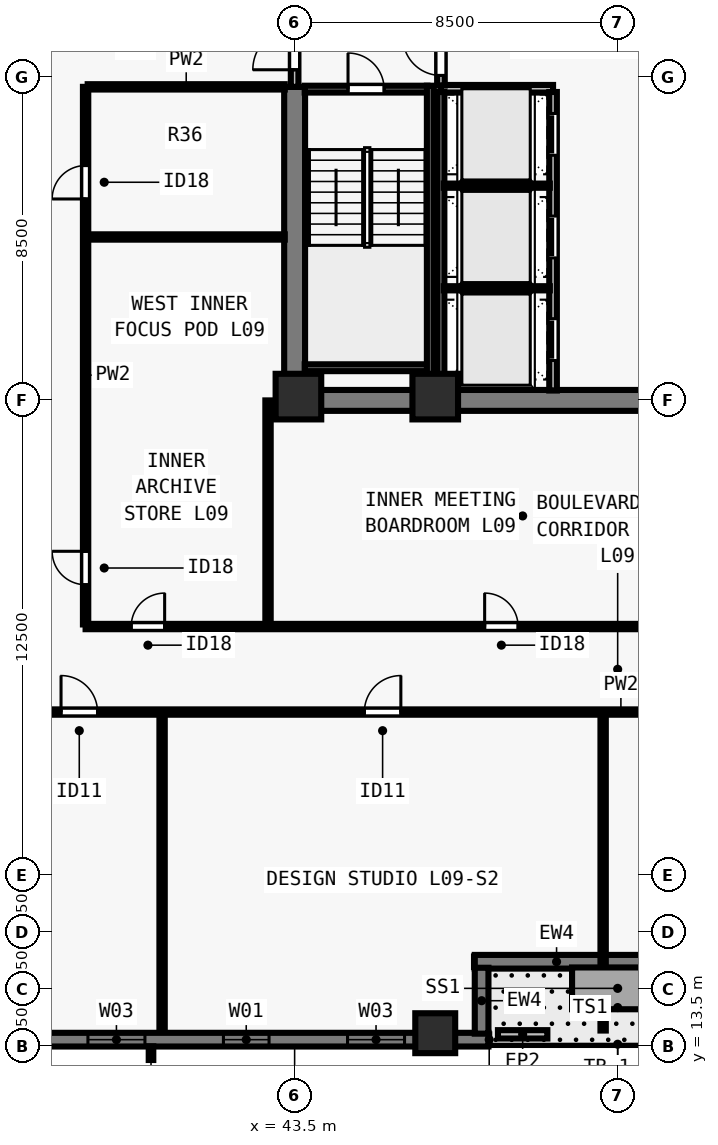
"""IFC4 building model, lengths in metres.
Left out: names, types, materials, properties, quantities, classifications, styles, units other than length and angle.
Written with IfcOpenShell. Run it as: python <this file> out.ifc"""

import sys

from ifc_helpers import new_model, si_unit, direction, frame, frame_2d, origin, origin_2d, place, context, subcontext, project, spatial, rectangle, extrude, element, fill, save


model = new_model("IFC4")
c1 = context("Model", 3, precision=1e-05, world=origin(), true_north=direction((0.0, 1.0)))
c2 = subcontext(c1, "Body", "Model", "MODEL_VIEW")
j1 = project(units=[si_unit("LENGTHUNIT", "METRE"), si_unit("PLANEANGLEUNIT", "RADIAN")], contexts=[c1])
p1 = place(None, origin())
s1 = spatial("IfcSite", under=j1, at=p1, CompositionType="ELEMENT")
p2 = place(p1, origin())
s2 = spatial("IfcBuilding", under=s1, at=p2, CompositionType="ELEMENT")
p3 = place(p2, frame((0.0, 0.0, 37.5)))
s3 = spatial("IfcBuildingStorey", under=s2, at=p3, CompositionType="ELEMENT", Elevation=37.5)
for number, where, z_axis, x_axis in (
    (1, (43.6, 30.6, 0.0), (0.0, 0.0, 1.0), (1.0, 0.0, 0.0)),
    (2, (47.2, 30.6, 0.0), (0.0, 0.0, 1.0), (1.0, 0.0, 0.0)),
):
    element("IfcColumn", number, at=place(p3, frame(where, z_axis=z_axis, x_axis=x_axis)), inside=s3, PredefinedType="COLUMN", context=c2, shape_type="SweptSolid", body=[
        extrude(rectangle(XDim=1.2, YDim=1.2, at=origin_2d()), origin(), (0.0, 0.0, 1.0), 3.5),
    ])
p4 = place(p3, frame((47.2, 13.85, 0.0), z_axis=(0.0, 0.0, 1.0), x_axis=(1.0, 0.0, 0.0)))
e3 = element("IfcColumn", 3, at=p4, inside=s3, PredefinedType="COLUMN", context=c2, shape_type="SweptSolid", body=[
    extrude(rectangle(XDim=1.05, YDim=1.05, at=origin_2d()), origin(), (0.0, 0.0, 1.0), 3.5),
])
p5 = place(p3, frame((48.6, 13.68, 0.0), z_axis=(0.0, 0.0, 1.0), x_axis=(-1.0, 0.0, 0.0)))
e4 = element("IfcWall", 4, at=p5, inside=s3, PredefinedType="SOLIDWALL", context=c2, shape_type="SweptSolid", body=[
    extrude(rectangle(XDim=18.762, YDim=0.36, at=frame_2d((9.381, 0.0))), origin(), (0.0, 0.0, 1.0), 3.28),
])
p6 = place(p5, frame((2.208, 0.0, 0.8)))
e5 = element("IfcOpeningElement", 5, at=p6, cuts=e4, PredefinedType="OPENING", context=c2, shape_type="SweptSolid", body=[
    extrude(rectangle(XDim=1.5, YDim=1.544, at=frame_2d((0.75, 0.772))), frame((0.0, 0.19, 0.0), z_axis=(0.0, -1.0, 0.0), x_axis=(1.0, 0.0, 0.0)), (0.0, 0.0, 1.0), 0.38),
])
p7 = place(p5, frame((5.773, 0.0, 0.8)))
e6 = element("IfcOpeningElement", 6, at=p7, cuts=e4, PredefinedType="OPENING", context=c2, shape_type="SweptSolid", body=[
    extrude(rectangle(XDim=1.2, YDim=1.544, at=frame_2d((0.6, 0.772))), frame((0.0, 0.19, 0.0), z_axis=(0.0, -1.0, 0.0), x_axis=(1.0, 0.0, 0.0)), (0.0, 0.0, 1.0), 0.38),
])
p8 = place(p5, frame((9.039, 0.0, 0.8)))
e7 = element("IfcOpeningElement", 7, at=p8, cuts=e4, PredefinedType="OPENING", context=c2, shape_type="SweptSolid", body=[
    extrude(rectangle(XDim=1.5, YDim=1.544, at=frame_2d((0.75, 0.772))), frame((0.0, 0.19, 0.0), z_axis=(0.0, -1.0, 0.0), x_axis=(1.0, 0.0, 0.0)), (0.0, 0.0, 1.0), 0.38),
])
p9 = place(p5, frame((12.604, 0.0, 0.8)))
e8 = element("IfcOpeningElement", 8, at=p9, cuts=e4, PredefinedType="OPENING", context=c2, shape_type="SweptSolid", body=[
    extrude(rectangle(XDim=1.2, YDim=1.544, at=frame_2d((0.6, 0.772))), frame((0.0, 0.19, 0.0), z_axis=(0.0, -1.0, 0.0), x_axis=(1.0, 0.0, 0.0)), (0.0, 0.0, 1.0), 0.38),
])
p10 = place(p3, frame((55.422, 15.73, 0.0), z_axis=(0.0, 0.0, 1.0), x_axis=(-1.0, 0.0, 0.0)))
e9 = element("IfcWall", 9, at=p10, inside=s3, PredefinedType="SOLIDWALL", context=c2, shape_type="SweptSolid", body=[
    extrude(rectangle(XDim=7.182, YDim=0.36, at=frame_2d((3.591, 0.0))), origin(), (0.0, 0.0, 1.0), 3.28),
])
p11 = place(p10, frame((1.727, 0.0, 0.0)))
e10 = element("IfcOpeningElement", 10, at=p11, cuts=e9, PredefinedType="OPENING", context=c2, shape_type="SweptSolid", body=[
    extrude(rectangle(XDim=1.0, YDim=2.15, at=frame_2d((0.5, 1.075))), frame((0.0, 0.19, 0.0), z_axis=(0.0, -1.0, 0.0), x_axis=(1.0, 0.0, 0.0)), (0.0, 0.0, 1.0), 0.38),
])
p12 = place(p3, frame((48.42, 15.572, 0.0), z_axis=(0.0, 0.0, 1.0), x_axis=(0.0, -1.0, 0.0)))
e11 = element("IfcWall", 11, at=p12, inside=s3, PredefinedType="SOLIDWALL", context=c2, shape_type="SweptSolid", body=[
    extrude(rectangle(XDim=1.734, YDim=0.36, at=frame_2d((0.867, 0.0))), origin(), (0.0, 0.0, 1.0), 3.28),
])
p13 = place(p3, frame((48.85, 13.82, 0.0), z_axis=(0.0, 0.0, 1.0), x_axis=(1.0, 0.0, 0.0)))
e12 = element("IfcWall", 12, at=p13, inside=s3, PredefinedType="PARAPET", context=c2, shape_type="SweptSolid", body=[
    extrude(rectangle(XDim=1.3, YDim=0.22, at=frame_2d((0.65, 0.0))), origin(), (0.0, 0.0, 1.0), 0.55),
])
p14 = place(p3, frame((43.225, 30.5, 0.0), z_axis=(0.0, 0.0, 1.0), x_axis=(1.0, 0.0, 0.0)))
e13 = element("IfcWall", 13, at=p14, inside=s3, PredefinedType="SHEAR", context=c2, shape_type="SweptSolid", body=[
    extrude(rectangle(XDim=17.55, YDim=0.55, at=frame_2d((8.775, 0.0))), origin(), (0.0, 0.0, 1.0), 3.28),
])
p15 = place(p3, frame((43.5, 30.765, 0.0), z_axis=(0.0, 0.0, 1.0), x_axis=(0.0, 1.0, 0.0)))
e14 = element("IfcWall", 14, at=p15, inside=s3, PredefinedType="SHEAR", context=c2, shape_type="SweptSolid", body=[
    extrude(rectangle(XDim=7.985, YDim=0.55, at=frame_2d((3.993, 0.0))), origin(), (0.0, 0.0, 1.0), 3.28),
])
p16 = place(p3, frame((47.35, 38.7, 0.0), z_axis=(0.0, 0.0, 1.0), x_axis=(1.0, 0.0, 0.0)))
e15 = element("IfcWall", 15, at=p16, inside=s3, PredefinedType="SOLIDWALL", context=c2, shape_type="SweptSolid", body=[
    extrude(rectangle(XDim=2.95, YDim=0.2, at=frame_2d((1.475, 0.0))), origin(), (0.0, 0.0, 1.0), 3.28),
])
p17 = place(p3, frame((50.3, 30.76, 0.0), z_axis=(0.0, 0.0, 1.0), x_axis=(0.0, 1.0, 0.0)))
e16 = element("IfcWall", 16, at=p17, inside=s3, PredefinedType="SOLIDWALL", context=c2, shape_type="SweptSolid", body=[
    extrude(rectangle(XDim=7.855, YDim=0.2, at=frame_2d((3.927, 0.0))), origin(), (0.0, 0.0, 1.0), 3.28),
])
p18 = place(p17, frame((0.79, 0.0, 0.0)))
e17 = element("IfcOpeningElement", 17, at=p18, cuts=e16, PredefinedType="OPENING", context=c2, shape_type="SweptSolid", body=[
    extrude(rectangle(XDim=1.1, YDim=2.2, at=frame_2d((0.55, 1.1))), frame((0.0, 0.11, 0.0), z_axis=(0.0, -1.0, 0.0), x_axis=(1.0, 0.0, 0.0)), (0.0, 0.0, 1.0), 0.22),
])
p19 = place(p17, frame((3.49, 0.0, 0.0)))
e18 = element("IfcOpeningElement", 18, at=p19, cuts=e16, PredefinedType="OPENING", context=c2, shape_type="SweptSolid", body=[
    extrude(rectangle(XDim=1.1, YDim=2.2, at=frame_2d((0.55, 1.1))), frame((0.0, 0.11, 0.0), z_axis=(0.0, -1.0, 0.0), x_axis=(1.0, 0.0, 0.0)), (0.0, 0.0, 1.0), 0.22),
])
p20 = place(p17, frame((6.19, 0.0, 0.0)))
e19 = element("IfcOpeningElement", 19, at=p20, cuts=e16, PredefinedType="OPENING", context=c2, shape_type="SweptSolid", body=[
    extrude(rectangle(XDim=1.1, YDim=2.2, at=frame_2d((0.55, 1.1))), frame((0.0, 0.11, 0.0), z_axis=(0.0, -1.0, 0.0), x_axis=(1.0, 0.0, 0.0)), (0.0, 0.0, 1.0), 0.22),
])
p21 = place(p3, frame((43.5, 38.75, 0.0), z_axis=(0.0, 0.0, 1.0), x_axis=(0.0, 1.0, 0.0)))
e20 = element("IfcWall", 20, at=p21, inside=s3, PredefinedType="SOLIDWALL", context=c2, shape_type="SweptSolid", body=[
    extrude(rectangle(XDim=2.05, YDim=0.2, at=frame_2d((1.025, 0.0))), origin(), (0.0, 0.0, 1.0), 3.28),
])
p22 = place(p21, frame((0.45, 0.0, 0.0)))
e21 = element("IfcOpeningElement", 21, at=p22, cuts=e20, PredefinedType="OPENING", context=c2, shape_type="SweptSolid", body=[
    extrude(rectangle(XDim=1.1, YDim=2.15, at=frame_2d((0.55, 1.075))), frame((0.0, 0.11, 0.0), z_axis=(0.0, -1.0, 0.0), x_axis=(1.0, 0.0, 0.0)), (0.0, 0.0, 1.0), 0.22),
])
p23 = place(p3, frame((47.35, 38.785, 0.0), z_axis=(0.0, 0.0, 1.0), x_axis=(0.0, 1.0, 0.0)))
e22 = element("IfcWall", 22, at=p23, inside=s3, PredefinedType="SOLIDWALL", context=c2, shape_type="SweptSolid", body=[
    extrude(rectangle(XDim=4.865, YDim=0.2, at=frame_2d((2.433, 0.0))), origin(), (0.0, 0.0, 1.0), 3.28),
])
p24 = place(p23, frame((0.265, 0.0, 0.0)))
e23 = element("IfcOpeningElement", 23, at=p24, cuts=e22, PredefinedType="OPENING", context=c2, shape_type="SweptSolid", body=[
    extrude(rectangle(XDim=1.0, YDim=2.15, at=frame_2d((0.5, 1.075))), frame((0.0, 0.11, 0.0), z_axis=(0.0, -1.0, 0.0), x_axis=(1.0, 0.0, 0.0)), (0.0, 0.0, 1.0), 0.22),
])
p25 = place(p3, frame((47.35, 30.76, 0.0), z_axis=(0.0, 0.0, 1.0), x_axis=(0.0, 1.0, 0.0)))
e24 = element("IfcWall", 24, at=p25, inside=s3, PredefinedType="SOLIDWALL", context=c2, shape_type="SweptSolid", body=[
    extrude(rectangle(XDim=7.855, YDim=0.18, at=frame_2d((3.927, 0.0))), origin(), (0.0, 0.0, 1.0), 3.28),
])
for number, where, z_axis, x_axis in (
    (25, (47.425, 33.45, 0.0), (0.0, 0.0, 1.0), (1.0, 0.0, 0.0)),
    (26, (47.425, 36.15, 0.0), (0.0, 0.0, 1.0), (1.0, 0.0, 0.0)),
):
    element("IfcWall", number, at=place(p3, frame(where, z_axis=z_axis, x_axis=x_axis)), inside=s3, PredefinedType="PARTITIONING", context=c2, shape_type="SweptSolid", body=[
        extrude(rectangle(XDim=2.79, YDim=0.11, at=frame_2d((1.395, 0.0))), origin(), (0.0, 0.0, 1.0), 3.28),
    ])
p26 = place(p3, frame((35.75, 22.3, 0.0), z_axis=(0.0, 0.0, 1.0), x_axis=(1.0, 0.0, 0.0)))
e27 = element("IfcWall", 27, at=p26, inside=s3, PredefinedType="PARTITIONING", context=c2, shape_type="SweptSolid", body=[
    extrude(rectangle(XDim=32.5, YDim=0.14, at=frame_2d((16.25, 0.0))), origin(), (0.0, 0.0, 1.0), 3.28),
])
p27 = place(p26, frame((1.604, 0.0, 0.0)))
e28 = element("IfcOpeningElement", 28, at=p27, cuts=e27, PredefinedType="OPENING", context=c2, shape_type="SweptSolid", body=[
    extrude(rectangle(XDim=0.96, YDim=2.12, at=frame_2d((0.48, 1.06))), frame((0.0, 0.08, 0.0), z_axis=(0.0, -1.0, 0.0), x_axis=(1.0, 0.0, 0.0)), (0.0, 0.0, 1.0), 0.16),
])
p28 = place(p26, frame((9.585, 0.0, 0.0)))
e29 = element("IfcOpeningElement", 29, at=p28, cuts=e27, PredefinedType="OPENING", context=c2, shape_type="SweptSolid", body=[
    extrude(rectangle(XDim=0.96, YDim=2.12, at=frame_2d((0.48, 1.06))), frame((0.0, 0.08, 0.0), z_axis=(0.0, -1.0, 0.0), x_axis=(1.0, 0.0, 0.0)), (0.0, 0.0, 1.0), 0.16),
])
p29 = place(p26, frame((22.125, 0.0, 0.0)))
e30 = element("IfcOpeningElement", 30, at=p29, cuts=e27, PredefinedType="OPENING", context=c2, shape_type="SweptSolid", body=[
    extrude(rectangle(XDim=0.96, YDim=2.12, at=frame_2d((0.48, 1.06))), frame((0.0, 0.08, 0.0), z_axis=(0.0, -1.0, 0.0), x_axis=(1.0, 0.0, 0.0)), (0.0, 0.0, 1.0), 0.16),
])
p30 = place(p26, frame((31.18, 0.0, 0.0)))
e31 = element("IfcOpeningElement", 31, at=p30, cuts=e27, PredefinedType="OPENING", context=c2, shape_type="SweptSolid", body=[
    extrude(rectangle(XDim=0.96, YDim=2.12, at=frame_2d((0.48, 1.06))), frame((0.0, 0.08, 0.0), z_axis=(0.0, -1.0, 0.0), x_axis=(1.0, 0.0, 0.0)), (0.0, 0.0, 1.0), 0.16),
])
p31 = place(p3, frame((38.0, 24.55, 0.0), z_axis=(0.0, 0.0, 1.0), x_axis=(1.0, 0.0, 0.0)))
e32 = element("IfcWall", 32, at=p31, inside=s3, PredefinedType="PARTITIONING", context=c2, shape_type="SweptSolid", body=[
    extrude(rectangle(XDim=28.0, YDim=0.14, at=frame_2d((14.0, 0.0))), origin(), (0.0, 0.0, 1.0), 3.28),
])
p32 = place(p31, frame((1.2, 0.0, 0.0)))
e33 = element("IfcOpeningElement", 33, at=p32, cuts=e32, PredefinedType="OPENING", context=c2, shape_type="SweptSolid", body=[
    extrude(rectangle(XDim=0.88, YDim=2.1, at=frame_2d((0.44, 1.05))), frame((0.0, 0.08, 0.0), z_axis=(0.0, -1.0, 0.0), x_axis=(1.0, 0.0, 0.0)), (0.0, 0.0, 1.0), 0.16),
])
p33 = place(p31, frame((10.5, 0.0, 0.0)))
e34 = element("IfcOpeningElement", 34, at=p33, cuts=e32, PredefinedType="OPENING", context=c2, shape_type="SweptSolid", body=[
    extrude(rectangle(XDim=0.88, YDim=2.1, at=frame_2d((0.44, 1.05))), frame((0.0, 0.08, 0.0), z_axis=(0.0, -1.0, 0.0), x_axis=(1.0, 0.0, 0.0)), (0.0, 0.0, 1.0), 0.16),
])
p34 = place(p31, frame((21.0, 0.0, 0.0)))
e35 = element("IfcOpeningElement", 35, at=p34, cuts=e32, PredefinedType="OPENING", context=c2, shape_type="SweptSolid", body=[
    extrude(rectangle(XDim=0.88, YDim=2.1, at=frame_2d((0.44, 1.05))), frame((0.0, 0.08, 0.0), z_axis=(0.0, -1.0, 0.0), x_axis=(1.0, 0.0, 0.0)), (0.0, 0.0, 1.0), 0.16),
])
p35 = place(p3, frame((38.0, 24.605, 0.0), z_axis=(0.0, 0.0, 1.0), x_axis=(0.0, 1.0, 0.0)))
e36 = element("IfcWall", 36, at=p35, inside=s3, PredefinedType="PARTITIONING", context=c2, shape_type="SweptSolid", body=[
    extrude(rectangle(XDim=14.145, YDim=0.14, at=frame_2d((7.073, 0.0))), origin(), (0.0, 0.0, 1.0), 3.28),
])
p36 = place(p35, frame((1.045, 0.0, 0.0)))
e37 = element("IfcOpeningElement", 37, at=p36, cuts=e36, PredefinedType="OPENING", context=c2, shape_type="SweptSolid", body=[
    extrude(rectangle(XDim=0.88, YDim=2.1, at=frame_2d((0.44, 1.05))), frame((0.0, 0.08, 0.0), z_axis=(0.0, -1.0, 0.0), x_axis=(1.0, 0.0, 0.0)), (0.0, 0.0, 1.0), 0.16),
])
p37 = place(p35, frame((11.195, 0.0, 0.0)))
e38 = element("IfcOpeningElement", 38, at=p37, cuts=e36, PredefinedType="OPENING", context=c2, shape_type="SweptSolid", body=[
    extrude(rectangle(XDim=0.88, YDim=2.1, at=frame_2d((0.44, 1.05))), frame((0.0, 0.08, 0.0), z_axis=(0.0, -1.0, 0.0), x_axis=(1.0, 0.0, 0.0)), (0.0, 0.0, 1.0), 0.16),
])
p38 = place(p3, frame((38.055, 38.75, 0.0), z_axis=(0.0, 0.0, 1.0), x_axis=(1.0, 0.0, 0.0)))
e39 = element("IfcWall", 39, at=p38, inside=s3, PredefinedType="PARTITIONING", context=c2, shape_type="SweptSolid", body=[
    extrude(rectangle(XDim=5.185, YDim=0.14, at=frame_2d((2.593, 0.0))), origin(), (0.0, 0.0, 1.0), 3.28),
])
p39 = place(p3, frame((42.8, 24.605, 0.0), z_axis=(0.0, 0.0, 1.0), x_axis=(0.0, 1.0, 0.0)))
e40 = element("IfcWall", 40, at=p39, inside=s3, PredefinedType="PARTITIONING", context=c2, shape_type="SweptSolid", body=[
    extrude(rectangle(XDim=5.895, YDim=0.14, at=frame_2d((2.948, 0.0))), origin(), (0.0, 0.0, 1.0), 2.439),
])
p40 = place(p3, frame((38.055, 34.8, 0.0), z_axis=(0.0, 0.0, 1.0), x_axis=(1.0, 0.0, 0.0)))
e41 = element("IfcWall", 41, at=p40, inside=s3, PredefinedType="PARTITIONING", context=c2, shape_type="SweptSolid", body=[
    extrude(rectangle(XDim=5.185, YDim=0.14, at=frame_2d((2.593, 0.0))), origin(), (0.0, 0.0, 1.0), 3.28),
])
p41 = place(p3, frame((40.012, 13.92, 0.0), z_axis=(0.0, 0.0, 1.0), x_axis=(0.0, 1.0, 0.0)))
e42 = element("IfcWall", 42, at=p41, inside=s3, PredefinedType="PARTITIONING", context=c2, shape_type="SweptSolid", body=[
    extrude(rectangle(XDim=8.28, YDim=0.14, at=frame_2d((4.14, 0.0))), origin(), (0.0, 0.0, 1.0), 3.28),
])
p42 = place(p3, frame((51.617, 13.92, 0.0), z_axis=(0.0, 0.0, 1.0), x_axis=(0.0, 1.0, 0.0)))
e43 = element("IfcWall", 43, at=p42, inside=s3, PredefinedType="PARTITIONING", context=c2, shape_type="SweptSolid", body=[
    extrude(rectangle(XDim=8.28, YDim=0.14, at=frame_2d((4.14, 0.0))), origin(), (0.0, 0.0, 1.0), 2.849),
])
p43 = place(p3, frame((43.765, 38.69, 0.0), z_axis=(0.0, 0.0, 1.0), x_axis=(1.0, 0.0, 0.0)))
e44 = element("IfcWall", 44, at=p43, inside=s3, PredefinedType="SOLIDWALL", context=c2, shape_type="SweptSolid", body=[
    extrude(rectangle(XDim=3.23, YDim=0.18, at=frame_2d((1.615, 0.0))), origin(), (0.0, 0.0, 1.0), 3.28),
])
p44 = place(p43, frame((1.14, 0.0, 0.0)))
e45 = element("IfcOpeningElement", 45, at=p44, cuts=e44, PredefinedType="OPENING", context=c2, shape_type="SweptSolid", body=[
    extrude(rectangle(XDim=0.95, YDim=2.15, at=frame_2d((0.475, 1.075))), frame((0.0, 0.1, 0.0), z_axis=(0.0, -1.0, 0.0), x_axis=(1.0, 0.0, 0.0)), (0.0, 0.0, 1.0), 0.2),
])
p45 = place(p3, frame((43.765, 31.36, 0.0), z_axis=(0.0, 0.0, 1.0), x_axis=(1.0, 0.0, 0.0)))
e46 = element("IfcWall", 46, at=p45, inside=s3, PredefinedType="SOLIDWALL", context=c2, shape_type="SweptSolid", body=[
    extrude(rectangle(XDim=3.23, YDim=0.18, at=frame_2d((1.615, 0.0))), origin(), (0.0, 0.0, 1.0), 3.28),
])
p46 = place(p3, frame((47.07, 38.78, 0.0), z_axis=(0.0, 0.0, 1.0), x_axis=(0.0, -1.0, 0.0)))
e47 = element("IfcWall", 47, at=p46, inside=s3, PredefinedType="SOLIDWALL", context=c2, shape_type="SweptSolid", body=[
    extrude(rectangle(XDim=8.017, YDim=0.18, at=frame_2d((4.009, 0.0))), origin(), (0.0, 0.0, 1.0), 3.28),
])
p47 = place(p6, origin())
e48 = element("IfcWindow", 48, at=p47, inside=s3, PartitioningType="SINGLE_PANEL", PredefinedType="WINDOW", context=c2, shape_type="SweptSolid", body=[
    extrude(rectangle(XDim=1.5, YDim=1.544, at=frame_2d((0.75, 0.772))), frame((0.0, -0.05, 0.0), z_axis=(0.0, -1.0, 0.0), x_axis=(1.0, 0.0, 0.0)), (0.0, 0.0, 1.0), 0.06),
])
fill(e5, e48)
p48 = place(p7, origin())
e49 = element("IfcWindow", 49, at=p48, inside=s3, PartitioningType="SINGLE_PANEL", PredefinedType="WINDOW", context=c2, shape_type="SweptSolid", body=[
    extrude(rectangle(XDim=1.2, YDim=1.544, at=frame_2d((0.6, 0.772))), frame((0.0, -0.05, 0.0), z_axis=(0.0, -1.0, 0.0), x_axis=(1.0, 0.0, 0.0)), (0.0, 0.0, 1.0), 0.06),
])
fill(e6, e49)
p49 = place(p8, origin())
e50 = element("IfcWindow", 50, at=p49, inside=s3, PartitioningType="SINGLE_PANEL", PredefinedType="WINDOW", context=c2, shape_type="SweptSolid", body=[
    extrude(rectangle(XDim=1.5, YDim=1.544, at=frame_2d((0.75, 0.772))), frame((0.0, -0.05, 0.0), z_axis=(0.0, -1.0, 0.0), x_axis=(1.0, 0.0, 0.0)), (0.0, 0.0, 1.0), 0.06),
])
fill(e7, e50)
p50 = place(p22, origin())
e51 = element("IfcDoor", 51, at=p50, inside=s3, OperationType="SINGLE_SWING_LEFT", PredefinedType="DOOR", context=c2, shape_type="SweptSolid", body=[
    extrude(rectangle(XDim=1.1, YDim=2.15, at=frame_2d((0.55, 1.075))), frame((0.0, 0.025, 0.0), z_axis=(0.0, -1.0, 0.0), x_axis=(1.0, 0.0, 0.0)), (0.0, 0.0, 1.0), 0.05),
])
fill(e21, e51)
p51 = place(p24, origin())
e52 = element("IfcDoor", 52, at=p51, inside=s3, OperationType="SINGLE_SWING_RIGHT", PredefinedType="DOOR", context=c2, shape_type="SweptSolid", body=[
    extrude(rectangle(XDim=1.0, YDim=2.15, at=frame_2d((0.5, 1.075))), frame((0.0, 0.025, 0.0), z_axis=(0.0, -1.0, 0.0), x_axis=(1.0, 0.0, 0.0)), (0.0, 0.0, 1.0), 0.05),
])
fill(e23, e52)
p52 = place(p18, origin())
e53 = element("IfcDoor", 53, at=p52, inside=s3, OperationType="SLIDING_TO_LEFT", PredefinedType="DOOR", context=c2, shape_type="SweptSolid", body=[
    extrude(rectangle(XDim=1.1, YDim=2.2, at=frame_2d((0.55, 1.1))), frame((0.0, 0.025, 0.0), z_axis=(0.0, -1.0, 0.0), x_axis=(1.0, 0.0, 0.0)), (0.0, 0.0, 1.0), 0.05),
])
fill(e17, e53)
p53 = place(p19, origin())
e54 = element("IfcDoor", 54, at=p53, inside=s3, OperationType="SLIDING_TO_LEFT", PredefinedType="DOOR", context=c2, shape_type="SweptSolid", body=[
    extrude(rectangle(XDim=1.1, YDim=2.2, at=frame_2d((0.55, 1.1))), frame((0.0, 0.025, 0.0), z_axis=(0.0, -1.0, 0.0), x_axis=(1.0, 0.0, 0.0)), (0.0, 0.0, 1.0), 0.05),
])
fill(e18, e54)
p54 = place(p20, origin())
e55 = element("IfcDoor", 55, at=p54, inside=s3, OperationType="SLIDING_TO_LEFT", PredefinedType="DOOR", context=c2, shape_type="SweptSolid", body=[
    extrude(rectangle(XDim=1.1, YDim=2.2, at=frame_2d((0.55, 1.1))), frame((0.0, 0.025, 0.0), z_axis=(0.0, -1.0, 0.0), x_axis=(1.0, 0.0, 0.0)), (0.0, 0.0, 1.0), 0.05),
])
fill(e19, e55)
p55 = place(p32, origin())
e56 = element("IfcDoor", 56, at=p55, inside=s3, OperationType="SINGLE_SWING_RIGHT", PredefinedType="DOOR", context=c2, shape_type="SweptSolid", body=[
    extrude(rectangle(XDim=0.88, YDim=2.1, at=frame_2d((0.44, 1.05))), frame((0.0, 0.025, 0.0), z_axis=(0.0, -1.0, 0.0), x_axis=(1.0, 0.0, 0.0)), (0.0, 0.0, 1.0), 0.05),
])
fill(e33, e56)
p56 = place(p33, origin())
e57 = element("IfcDoor", 57, at=p56, inside=s3, OperationType="SINGLE_SWING_LEFT", PredefinedType="DOOR", context=c2, shape_type="SweptSolid", body=[
    extrude(rectangle(XDim=0.88, YDim=2.1, at=frame_2d((0.44, 1.05))), frame((0.0, 0.025, 0.0), z_axis=(0.0, -1.0, 0.0), x_axis=(1.0, 0.0, 0.0)), (0.0, 0.0, 1.0), 0.05),
])
fill(e34, e57)
p57 = place(p36, origin())
e58 = element("IfcDoor", 58, at=p57, inside=s3, OperationType="SINGLE_SWING_RIGHT", PredefinedType="DOOR", context=c2, shape_type="SweptSolid", body=[
    extrude(rectangle(XDim=0.88, YDim=2.1, at=frame_2d((0.44, 1.05))), frame((0.0, 0.025, 0.0), z_axis=(0.0, -1.0, 0.0), x_axis=(1.0, 0.0, 0.0)), (0.0, 0.0, 1.0), 0.05),
])
fill(e37, e58)
p58 = place(p37, origin())
e59 = element("IfcDoor", 59, at=p58, inside=s3, OperationType="SINGLE_SWING_LEFT", PredefinedType="DOOR", context=c2, shape_type="SweptSolid", body=[
    extrude(rectangle(XDim=0.88, YDim=2.1, at=frame_2d((0.44, 1.05))), frame((0.0, 0.025, 0.0), z_axis=(0.0, -1.0, 0.0), x_axis=(1.0, 0.0, 0.0)), (0.0, 0.0, 1.0), 0.05),
])
fill(e38, e59)
p59 = place(p27, origin())
e60 = element("IfcDoor", 60, at=p59, inside=s3, OperationType="SINGLE_SWING_LEFT", PredefinedType="DOOR", context=c2, shape_type="SweptSolid", body=[
    extrude(rectangle(XDim=0.96, YDim=2.12, at=frame_2d((0.48, 1.06))), frame((0.0, 0.025, 0.0), z_axis=(0.0, -1.0, 0.0), x_axis=(1.0, 0.0, 0.0)), (0.0, 0.0, 1.0), 0.05),
])
fill(e28, e60)
p60 = place(p28, origin())
e61 = element("IfcDoor", 61, at=p60, inside=s3, OperationType="SINGLE_SWING_RIGHT", PredefinedType="DOOR", context=c2, shape_type="SweptSolid", body=[
    extrude(rectangle(XDim=0.96, YDim=2.12, at=frame_2d((0.48, 1.06))), frame((0.0, 0.025, 0.0), z_axis=(0.0, -1.0, 0.0), x_axis=(1.0, 0.0, 0.0)), (0.0, 0.0, 1.0), 0.05),
])
fill(e29, e61)
p61 = place(p44, origin())
e62 = element("IfcDoor", 62, at=p61, inside=s3, OperationType="SINGLE_SWING_LEFT", PredefinedType="DOOR", context=c2, shape_type="SweptSolid", body=[
    extrude(rectangle(XDim=0.95, YDim=2.15, at=frame_2d((0.475, 1.075))), frame((0.0, 0.025, 0.0), z_axis=(0.0, -1.0, 0.0), x_axis=(1.0, 0.0, 0.0)), (0.0, 0.0, 1.0), 0.05),
])
fill(e45, e62)
save(model, sys.argv[1])
